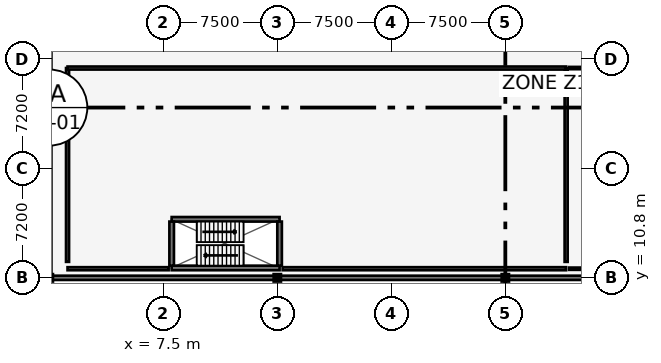
"""IFC4 building model, lengths in metres.
Left out: names, types, materials, properties, quantities, classifications, styles, units other than length and angle.
Written with IfcOpenShell. Run it as: python <this file> out.ifc"""

import sys

from ifc_helpers import new_model, si_unit, direction, frame, frame_2d, origin, origin_2d, place, context, subcontext, project, spatial, rectangle, i_section, extrude, element, fill, save


model = new_model("IFC4")
c1 = context("Model", 3, precision=1e-05, world=origin(), true_north=direction((0.0, 1.0)))
c2 = subcontext(c1, "Body", "Model", "MODEL_VIEW")
j1 = project(units=[si_unit("LENGTHUNIT", "METRE"), si_unit("PLANEANGLEUNIT", "RADIAN")], contexts=[c1])
p1 = place(None, origin())
s1 = spatial("IfcSite", under=j1, at=p1, CompositionType="ELEMENT")
p2 = place(p1, origin())
s2 = spatial("IfcBuilding", under=s1, at=p2, CompositionType="ELEMENT")
p3 = place(p2, frame((0.0, 0.0, 9.0)))
s3 = spatial("IfcBuildingStorey", under=s2, at=p3, CompositionType="ELEMENT", Elevation=9.0)
for number, where, z_axis, x_axis in (
    (1, (15.0, 10.8, 0.0), (0.0, 0.0, 1.0), (1.0, 0.0, 0.0)),
    (2, (30.0, 10.8, 0.0), (0.0, 0.0, 1.0), (1.0, 0.0, 0.0)),
):
    element("IfcColumn", number, at=place(p3, frame(where, z_axis=z_axis, x_axis=x_axis)), inside=s3, PredefinedType="COLUMN", context=c2, shape_type="SweptSolid", body=[
        extrude(i_section(OverallWidth=0.307, OverallDepth=0.315, WebThickness=0.012, FlangeThickness=0.019, at=origin_2d()), origin(), (0.0, 0.0, 1.0), 4.2),
    ])
p4 = place(p3, frame((0.0, 10.8, 0.0), z_axis=(0.0, 0.0, 1.0), x_axis=(1.0, 0.0, 0.0)))
e3 = element("IfcWall", 3, at=p4, inside=s3, PredefinedType="SOLIDWALL", context=c2, shape_type="SweptSolid", body=[
    extrude(rectangle(XDim=93.6, YDim=0.28, at=frame_2d((46.8, 0.0))), origin(), (0.0, 0.0, 1.0), 3.058),
])
p5 = place(p4, frame((2.2, 0.0, 0.78)))
e4 = element("IfcOpeningElement", 4, at=p5, cuts=e3, PredefinedType="OPENING", context=c2, shape_type="SweptSolid", body=[
    extrude(rectangle(XDim=1.25, YDim=1.7, at=frame_2d((0.625, 0.85))), frame((0.0, 0.15, 0.0), z_axis=(0.0, -1.0, 0.0), x_axis=(1.0, 0.0, 0.0)), (0.0, 0.0, 1.0), 0.3),
])
p6 = place(p4, frame((9.4, 0.0, 0.78)))
e5 = element("IfcOpeningElement", 5, at=p6, cuts=e3, PredefinedType="OPENING", context=c2, shape_type="SweptSolid", body=[
    extrude(rectangle(XDim=1.35, YDim=1.75, at=frame_2d((0.675, 0.875))), frame((0.0, 0.15, 0.0), z_axis=(0.0, -1.0, 0.0), x_axis=(1.0, 0.0, 0.0)), (0.0, 0.0, 1.0), 0.3),
])
p7 = place(p4, frame((16.6, 0.0, 0.78)))
e6 = element("IfcOpeningElement", 6, at=p7, cuts=e3, PredefinedType="OPENING", context=c2, shape_type="SweptSolid", body=[
    extrude(rectangle(XDim=1.5, YDim=1.75, at=frame_2d((0.75, 0.875))), frame((0.0, 0.15, 0.0), z_axis=(0.0, -1.0, 0.0), x_axis=(1.0, 0.0, 0.0)), (0.0, 0.0, 1.0), 0.3),
])
p8 = place(p4, frame((23.8, 0.0, 0.78)))
e7 = element("IfcOpeningElement", 7, at=p8, cuts=e3, PredefinedType="OPENING", context=c2, shape_type="SweptSolid", body=[
    extrude(rectangle(XDim=1.65, YDim=1.8, at=frame_2d((0.825, 0.9))), frame((0.0, 0.15, 0.0), z_axis=(0.0, -1.0, 0.0), x_axis=(1.0, 0.0, 0.0)), (0.0, 0.0, 1.0), 0.3),
])
p9 = place(p4, frame((31.0, 0.0, 0.78)))
e8 = element("IfcOpeningElement", 8, at=p9, cuts=e3, PredefinedType="OPENING", context=c2, shape_type="SweptSolid", body=[
    extrude(rectangle(XDim=1.95, YDim=1.8, at=frame_2d((0.975, 0.9))), frame((0.0, 0.15, 0.0), z_axis=(0.0, -1.0, 0.0), x_axis=(1.0, 0.0, 0.0)), (0.0, 0.0, 1.0), 0.3),
])
p10 = place(p4, frame((38.2, 0.0, 0.78)))
e9 = element("IfcOpeningElement", 9, at=p10, cuts=e3, PredefinedType="OPENING", context=c2, shape_type="SweptSolid", body=[
    extrude(rectangle(XDim=2.1, YDim=1.8, at=frame_2d((1.05, 0.9))), frame((0.0, 0.15, 0.0), z_axis=(0.0, -1.0, 0.0), x_axis=(1.0, 0.0, 0.0)), (0.0, 0.0, 1.0), 0.3),
])
p11 = place(p4, frame((52.6, 0.0, 0.78)))
e10 = element("IfcOpeningElement", 10, at=p11, cuts=e3, PredefinedType="OPENING", context=c2, shape_type="SweptSolid", body=[
    extrude(rectangle(XDim=1.25, YDim=1.7, at=frame_2d((0.625, 0.85))), frame((0.0, 0.15, 0.0), z_axis=(0.0, -1.0, 0.0), x_axis=(1.0, 0.0, 0.0)), (0.0, 0.0, 1.0), 0.3),
])
p12 = place(p4, frame((67.0, 0.0, 0.78)))
e11 = element("IfcOpeningElement", 11, at=p12, cuts=e3, PredefinedType="OPENING", context=c2, shape_type="SweptSolid", body=[
    extrude(rectangle(XDim=1.5, YDim=1.75, at=frame_2d((0.75, 0.875))), frame((0.0, 0.15, 0.0), z_axis=(0.0, -1.0, 0.0), x_axis=(1.0, 0.0, 0.0)), (0.0, 0.0, 1.0), 0.3),
])
p13 = place(p4, frame((81.4, 0.0, 0.78)))
e12 = element("IfcOpeningElement", 12, at=p13, cuts=e3, PredefinedType="OPENING", context=c2, shape_type="SweptSolid", body=[
    extrude(rectangle(XDim=1.95, YDim=1.8, at=frame_2d((0.975, 0.9))), frame((0.0, 0.15, 0.0), z_axis=(0.0, -1.0, 0.0), x_axis=(1.0, 0.0, 0.0)), (0.0, 0.0, 1.0), 0.3),
])
for number, where, z_axis, x_axis in (
    (13, (8.05, 11.45, 0.0), (0.0, 0.0, 1.0), (1.0, 0.0, 0.0)),
    (14, (15.15, 14.65, 0.0), (0.0, 0.0, 1.0), (-1.0, 0.0, 0.0)),
):
    element("IfcWall", number, at=place(p3, frame(where, z_axis=z_axis, x_axis=x_axis)), inside=s3, PredefinedType="SHEAR", context=c2, shape_type="SweptSolid", body=[
        extrude(rectangle(XDim=7.1, YDim=0.3, at=frame_2d((3.55, 0.0))), origin(), (0.0, 0.0, 1.0), 3.45),
    ])
p14 = place(p3, frame((15.15, 11.6, 0.0), z_axis=(0.0, 0.0, 1.0), x_axis=(0.0, 1.0, 0.0)))
e15 = element("IfcWall", 15, at=p14, inside=s3, PredefinedType="SHEAR", context=c2, shape_type="SweptSolid", body=[
    extrude(rectangle(XDim=2.9, YDim=0.3, at=frame_2d((1.45, 0.0))), origin(), (0.0, 0.0, 1.0), 3.45),
])
p15 = place(p3, frame((8.05, 14.5, 0.0), z_axis=(0.0, 0.0, 1.0), x_axis=(0.0, -1.0, 0.0)))
e16 = element("IfcWall", 16, at=p15, inside=s3, PredefinedType="SHEAR", context=c2, shape_type="SweptSolid", body=[
    extrude(rectangle(XDim=2.9, YDim=0.3, at=frame_2d((1.45, 0.0))), origin(), (0.0, 0.0, 1.0), 3.45),
])
p16 = place(p15, frame((0.75, 0.0, 0.0)))
e17 = element("IfcOpeningElement", 17, at=p16, cuts=e16, PredefinedType="OPENING", context=c2, shape_type="SweptSolid", body=[
    extrude(rectangle(XDim=1.07, YDim=2.15, at=frame_2d((0.535, 1.075))), frame((0.0, 0.16, 0.0), z_axis=(0.0, -1.0, 0.0), x_axis=(1.0, 0.0, 0.0)), (0.0, 0.0, 1.0), 0.32),
])
p17 = place(p3, frame((34.0, 11.4, 0.0), z_axis=(0.0, 0.0, 1.0), x_axis=(-1.0, 0.0, 0.0)))
e18 = element("IfcWall", 18, at=p17, inside=s3, PredefinedType="SOLIDWALL", context=c2, shape_type="SweptSolid", body=[
    extrude(rectangle(XDim=18.65, YDim=0.2, at=frame_2d((9.325, 0.0))), origin(), (0.0, 0.0, 1.0), 3.287),
])
p18 = place(p3, frame((7.85, 11.4, 0.0), z_axis=(0.0, 0.0, 1.0), x_axis=(-1.0, 0.0, 0.0)))
e19 = element("IfcWall", 19, at=p18, inside=s3, PredefinedType="SOLIDWALL", context=c2, shape_type="SweptSolid", body=[
    extrude(rectangle(XDim=6.65, YDim=0.2, at=frame_2d((3.325, 0.0))), origin(), (0.0, 0.0, 1.0), 3.6),
])
for number, where, z_axis, x_axis in (
    (20, (34.0, 11.85, 0.0), (0.0, 0.0, 1.0), (0.0, 1.0, 0.0)),
    (21, (1.2, 24.6, 0.0), (0.0, 0.0, 1.0), (0.0, -1.0, 0.0)),
):
    element("IfcWall", number, at=place(p3, frame(where, z_axis=z_axis, x_axis=x_axis)), inside=s3, PredefinedType="SOLIDWALL", context=c2, shape_type="SweptSolid", body=[
        extrude(rectangle(XDim=12.75, YDim=0.2, at=frame_2d((6.375, 0.0))), origin(), (0.0, 0.0, 1.0), 3.6),
    ])
p19 = place(p3, frame((1.2, 24.6, 0.0), z_axis=(0.0, 0.0, 1.0), x_axis=(1.0, 0.0, 0.0)))
e22 = element("IfcWall", 22, at=p19, inside=s3, PredefinedType="SOLIDWALL", context=c2, shape_type="SweptSolid", body=[
    extrude(rectangle(XDim=32.8, YDim=0.2, at=frame_2d((16.4, 0.0))), origin(), (0.0, 0.0, 1.0), 3.287),
])
p20 = place(p19, frame((15.5, 0.0, 0.0)))
e23 = element("IfcOpeningElement", 23, at=p20, cuts=e22, PredefinedType="OPENING", context=c2, shape_type="SweptSolid", body=[
    extrude(rectangle(XDim=1.8, YDim=2.2, at=frame_2d((0.9, 1.1))), frame((0.0, 0.11, 0.0), z_axis=(0.0, -1.0, 0.0), x_axis=(1.0, 0.0, 0.0)), (0.0, 0.0, 1.0), 0.22),
])
p21 = place(p19, frame((27.8, 0.0, 0.0)))
e24 = element("IfcOpeningElement", 24, at=p21, cuts=e22, PredefinedType="OPENING", context=c2, shape_type="SweptSolid", body=[
    extrude(rectangle(XDim=1.8, YDim=2.2, at=frame_2d((0.9, 1.1))), frame((0.0, 0.11, 0.0), z_axis=(0.0, -1.0, 0.0), x_axis=(1.0, 0.0, 0.0)), (0.0, 0.0, 1.0), 0.22),
])
p22 = place(p3, frame((41.25, 11.4, 0.0), z_axis=(0.0, 0.0, 1.0), x_axis=(-1.0, 0.0, 0.0)))
e25 = element("IfcWall", 25, at=p22, inside=s3, PredefinedType="PARTITIONING", context=c2, shape_type="SweptSolid", body=[
    extrude(rectangle(XDim=7.05, YDim=0.15, at=frame_2d((3.525, 0.0))), origin(), (0.0, 0.0, 1.0), 3.6),
])
p23 = place(p3, frame((34.2, 24.6, 0.0), z_axis=(0.0, 0.0, 1.0), x_axis=(1.0, 0.0, 0.0)))
e26 = element("IfcWall", 26, at=p23, inside=s3, PredefinedType="PARTITIONING", context=c2, shape_type="SweptSolid", body=[
    extrude(rectangle(XDim=33.8, YDim=0.15, at=frame_2d((16.9, 0.0))), origin(), (0.0, 0.0, 1.0), 3.235),
])
p24 = place(p23, frame((16.38, 0.0, 0.0)))
e27 = element("IfcOpeningElement", 27, at=p24, cuts=e26, PredefinedType="OPENING", context=c2, shape_type="SweptSolid", body=[
    extrude(rectangle(XDim=1.04, YDim=2.15, at=frame_2d((0.52, 1.075))), frame((0.0, 0.085, 0.0), z_axis=(0.0, -1.0, 0.0), x_axis=(1.0, 0.0, 0.0)), (0.0, 0.0, 1.0), 0.17),
])
p25 = place(p23, frame((29.56, 0.0, 0.0)))
e28 = element("IfcOpeningElement", 28, at=p25, cuts=e26, PredefinedType="OPENING", context=c2, shape_type="SweptSolid", body=[
    extrude(rectangle(XDim=1.04, YDim=2.15, at=frame_2d((0.52, 1.075))), frame((0.0, 0.085, 0.0), z_axis=(0.0, -1.0, 0.0), x_axis=(1.0, 0.0, 0.0)), (0.0, 0.0, 1.0), 0.17),
])
p26 = place(p5, origin())
e29 = element("IfcWindow", 29, at=p26, inside=s3, PartitioningType="SINGLE_PANEL", PredefinedType="WINDOW", context=c2, shape_type="SweptSolid", body=[
    extrude(rectangle(XDim=1.25, YDim=1.7, at=frame_2d((0.625, 0.85))), frame((0.0, 0.03, 0.0), z_axis=(0.0, -1.0, 0.0), x_axis=(1.0, 0.0, 0.0)), (0.0, 0.0, 1.0), 0.06),
])
fill(e4, e29)
p27 = place(p6, origin())
e30 = element("IfcWindow", 30, at=p27, inside=s3, PartitioningType="SINGLE_PANEL", PredefinedType="WINDOW", context=c2, shape_type="SweptSolid", body=[
    extrude(rectangle(XDim=1.35, YDim=1.75, at=frame_2d((0.675, 0.875))), frame((0.0, 0.03, 0.0), z_axis=(0.0, -1.0, 0.0), x_axis=(1.0, 0.0, 0.0)), (0.0, 0.0, 1.0), 0.06),
])
fill(e5, e30)
p28 = place(p7, origin())
e31 = element("IfcWindow", 31, at=p28, inside=s3, PartitioningType="SINGLE_PANEL", PredefinedType="WINDOW", context=c2, shape_type="SweptSolid", body=[
    extrude(rectangle(XDim=1.5, YDim=1.75, at=frame_2d((0.75, 0.875))), frame((0.0, 0.03, 0.0), z_axis=(0.0, -1.0, 0.0), x_axis=(1.0, 0.0, 0.0)), (0.0, 0.0, 1.0), 0.06),
])
fill(e6, e31)
p29 = place(p8, origin())
e32 = element("IfcWindow", 32, at=p29, inside=s3, PartitioningType="SINGLE_PANEL", PredefinedType="WINDOW", context=c2, shape_type="SweptSolid", body=[
    extrude(rectangle(XDim=1.65, YDim=1.8, at=frame_2d((0.825, 0.9))), frame((0.0, 0.03, 0.0), z_axis=(0.0, -1.0, 0.0), x_axis=(1.0, 0.0, 0.0)), (0.0, 0.0, 1.0), 0.06),
])
fill(e7, e32)
p30 = place(p9, origin())
e33 = element("IfcWindow", 33, at=p30, inside=s3, PartitioningType="SINGLE_PANEL", PredefinedType="WINDOW", context=c2, shape_type="SweptSolid", body=[
    extrude(rectangle(XDim=1.95, YDim=1.8, at=frame_2d((0.975, 0.9))), frame((0.0, 0.03, 0.0), z_axis=(0.0, -1.0, 0.0), x_axis=(1.0, 0.0, 0.0)), (0.0, 0.0, 1.0), 0.06),
])
fill(e8, e33)
p31 = place(p16, origin())
e34 = element("IfcDoor", 34, at=p31, inside=s3, OperationType="SINGLE_SWING_RIGHT", PredefinedType="DOOR", context=c2, shape_type="SweptSolid", body=[
    extrude(rectangle(XDim=1.07, YDim=2.15, at=frame_2d((0.535, 1.075))), frame((0.0, 0.025, 0.0), z_axis=(0.0, -1.0, 0.0), x_axis=(1.0, 0.0, 0.0)), (0.0, 0.0, 1.0), 0.05),
])
fill(e17, e34)
p32 = place(p20, origin())
e35 = element("IfcDoor", 35, at=p32, inside=s3, OperationType="DOUBLE_SWING_LEFT", PredefinedType="DOOR", context=c2, shape_type="SweptSolid", body=[
    extrude(rectangle(XDim=1.8, YDim=2.2, at=frame_2d((0.9, 1.1))), frame((0.0, 0.025, 0.0), z_axis=(0.0, -1.0, 0.0), x_axis=(1.0, 0.0, 0.0)), (0.0, 0.0, 1.0), 0.05),
])
fill(e23, e35)
p33 = place(p21, origin())
e36 = element("IfcDoor", 36, at=p33, inside=s3, OperationType="DOUBLE_SWING_LEFT", PredefinedType="DOOR", context=c2, shape_type="SweptSolid", body=[
    extrude(rectangle(XDim=1.8, YDim=2.2, at=frame_2d((0.9, 1.1))), frame((0.0, 0.025, 0.0), z_axis=(0.0, -1.0, 0.0), x_axis=(1.0, 0.0, 0.0)), (0.0, 0.0, 1.0), 0.05),
])
fill(e24, e36)
save(model, sys.argv[1])
